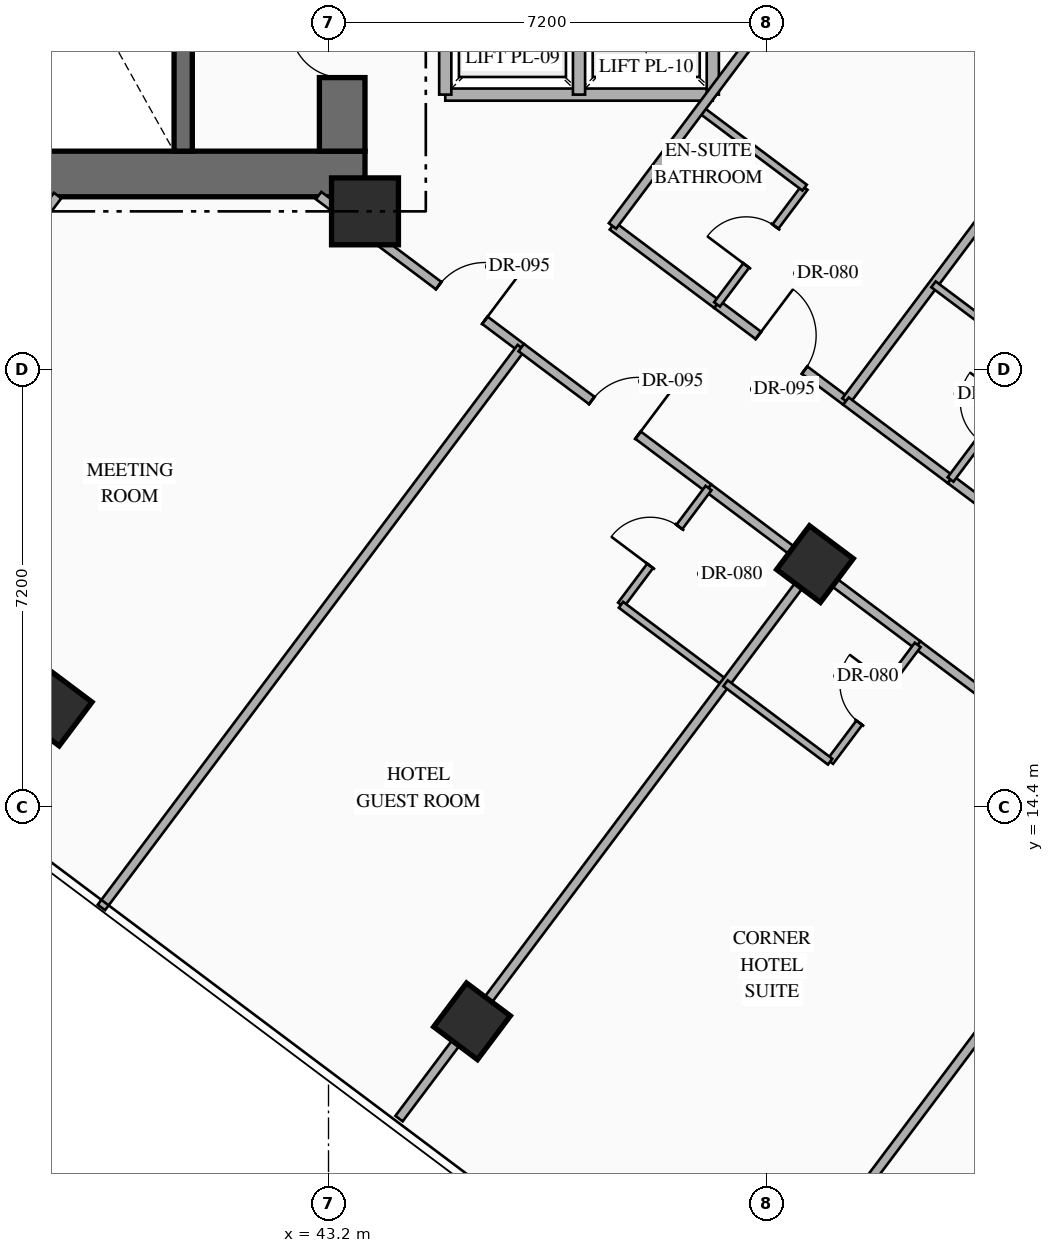
"""IFC4 building model, lengths in metres.
Left out: names, types, materials, properties, quantities, classifications, styles, units other than length and angle.
Written with IfcOpenShell. Run it as: python <this file> out.ifc"""

import sys

from ifc_helpers import new_model, si_unit, direction, frame, frame_2d, origin, origin_2d, place, context, subcontext, project, spatial, rectangle, hollow_rectangle, extrude, element, fill, save


model = new_model("IFC4")
c1 = context("Model", 3, precision=1e-05, world=origin(), true_north=direction((0.0, 1.0)))
c2 = subcontext(c1, "Body", "Model", "MODEL_VIEW")
j1 = project(units=[si_unit("LENGTHUNIT", "METRE"), si_unit("PLANEANGLEUNIT", "RADIAN")], contexts=[c1])
p1 = place(None, origin())
s1 = spatial("IfcSite", under=j1, at=p1, CompositionType="ELEMENT")
p2 = place(p1, origin())
s2 = spatial("IfcBuilding", under=s1, at=p2, CompositionType="ELEMENT")
p3 = place(p2, frame((0.0, 0.0, 88.0)))
s3 = spatial("IfcBuildingStorey", under=s2, at=p3, CompositionType="ELEMENT", Elevation=88.0)
p4 = place(p3, frame((35.74, 24.815, 0.0), z_axis=(0.0, 0.0, 1.0), x_axis=(1.0, 0.0, 0.0)))
e1 = element("IfcWall", 1, at=p4, inside=s3, PredefinedType="SHEAR", context=c2, shape_type="SweptSolid", body=[
    extrude(rectangle(XDim=8.06, YDim=0.75, at=frame_2d((4.03, 0.0))), origin(), (0.0, 0.0, 1.0), 3.35),
])
p5 = place(p3, frame((43.425, 25.19, 0.0), z_axis=(0.0, 0.0, 1.0), x_axis=(0.0, 1.0, 0.0)))
e2 = element("IfcWall", 2, at=p5, inside=s3, PredefinedType="SHEAR", context=c2, shape_type="SweptSolid", body=[
    extrude(rectangle(XDim=9.48, YDim=0.75, at=frame_2d((4.74, 0.0))), origin(), (0.0, 0.0, 1.0), 3.35),
])
p6 = place(p5, frame((1.21, 0.0, 0.0)))
e3 = element("IfcOpeningElement", 3, at=p6, cuts=e2, PredefinedType="OPENING", context=c2, shape_type="SweptSolid", body=[
    extrude(rectangle(XDim=0.85, YDim=2.08, at=frame_2d((0.425, 1.04))), frame((0.0, 0.385, 0.0), z_axis=(0.0, -1.0, 0.0), x_axis=(1.0, 0.0, 0.0)), (0.0, 0.0, 1.0), 0.77),
])
p7 = place(p5, frame((4.46, 0.0, 0.0)))
e4 = element("IfcOpeningElement", 4, at=p7, cuts=e2, PredefinedType="OPENING", context=c2, shape_type="SweptSolid", body=[
    extrude(rectangle(XDim=0.85, YDim=2.08, at=frame_2d((0.425, 1.04))), frame((0.0, 0.385, 0.0), z_axis=(0.0, -1.0, 0.0), x_axis=(1.0, 0.0, 0.0)), (0.0, 0.0, 1.0), 0.77),
])
p8 = place(p3, frame((40.81, 25.19, 0.0), z_axis=(0.0, 0.0, 1.0), x_axis=(0.0, 1.0, 0.0)))
e5 = element("IfcWall", 5, at=p8, inside=s3, PredefinedType="SHEAR", context=c2, shape_type="SweptSolid", body=[
    extrude(rectangle(XDim=9.48, YDim=0.3, at=frame_2d((4.74, 0.0))), origin(), (0.0, 0.0, 1.0), 3.35),
])
p9 = place(p3, frame((43.8, 24.2, 0.0), z_axis=(0.0, 0.0, 1.0), x_axis=(1.0, 0.0, 0.0)))
e6 = element("IfcColumn", 6, at=p9, inside=s3, PredefinedType="COLUMN", context=c2, shape_type="SweptSolid", body=[
    extrude(rectangle(XDim=1.1, YDim=1.1, at=origin_2d()), origin(), (0.0, 0.0, 1.0), 3.35),
])
for number, where, z_axis, x_axis in (
    (7, (38.68, 16.04, 0.0), (0.0, 0.0, 1.0), (0.8, -0.6, 0.0)),
    (8, (45.56, 10.88, 0.0), (0.0, 0.0, 1.0), (0.8, -0.6, 0.0)),
    (9, (51.2, 18.4, 0.0), (0.0, 0.0, 1.0), (0.8, -0.6, 0.0)),
):
    element("IfcColumn", number, at=place(p3, frame(where, z_axis=z_axis, x_axis=x_axis)), inside=s3, PredefinedType="COLUMN", context=c2, shape_type="SweptSolid", body=[
        extrude(hollow_rectangle(XDim=0.9, YDim=0.9, WallThickness=0.036, at=origin_2d()), origin(), (0.0, 0.0, 1.0), 3.35),
    ])
p10 = place(p3, frame((44.86, 40.73, 0.0), z_axis=(0.0, 0.0, 1.0), x_axis=(0.800006902154, -0.599990797017, 0.0)))
e10 = element("IfcWall", 10, at=p10, inside=s3, PredefinedType="STANDARD", context=c2, shape_type="SweptSolid", body=[
    extrude(rectangle(XDim=29.712, YDim=0.28, at=frame_2d((14.856, 0.0))), origin(), (0.0, 0.0, 1.0), 3.05),
])
p11 = place(p10, frame((14.249, 0.0, 0.0)))
e11 = element("IfcOpeningElement", 11, at=p11, cuts=e10, PredefinedType="OPENING", context=c2, shape_type="SweptSolid", body=[
    extrude(rectangle(XDim=1.1, YDim=2.2, at=frame_2d((0.55, 1.1))), frame((0.0, 0.15, 0.0), z_axis=(0.0, -1.0, 0.0), x_axis=(1.0, 0.0, 0.0)), (0.0, 0.0, 1.0), 0.3),
])
p12 = place(p10, frame((1.612, 0.0, 0.85)))
e12 = element("IfcOpeningElement", 12, at=p12, cuts=e10, PredefinedType="OPENING", context=c2, shape_type="SweptSolid", body=[
    extrude(rectangle(XDim=1.4, YDim=1.8, at=frame_2d((0.7, 0.9))), frame((0.0, 0.15, 0.0), z_axis=(0.0, -1.0, 0.0), x_axis=(1.0, 0.0, 0.0)), (0.0, 0.0, 1.0), 0.3),
])
p13 = place(p10, frame((5.667, 0.0, 0.85)))
e13 = element("IfcOpeningElement", 13, at=p13, cuts=e10, PredefinedType="OPENING", context=c2, shape_type="SweptSolid", body=[
    extrude(rectangle(XDim=1.4, YDim=1.8, at=frame_2d((0.7, 0.9))), frame((0.0, 0.15, 0.0), z_axis=(0.0, -1.0, 0.0), x_axis=(1.0, 0.0, 0.0)), (0.0, 0.0, 1.0), 0.3),
])
p14 = place(p10, frame((9.912, 0.0, 0.85)))
e14 = element("IfcOpeningElement", 14, at=p14, cuts=e10, PredefinedType="OPENING", context=c2, shape_type="SweptSolid", body=[
    extrude(rectangle(XDim=1.4, YDim=1.8, at=frame_2d((0.7, 0.9))), frame((0.0, 0.15, 0.0), z_axis=(0.0, -1.0, 0.0), x_axis=(1.0, 0.0, 0.0)), (0.0, 0.0, 1.0), 0.3),
])
p15 = place(p10, frame((19.528, 0.0, 0.85)))
e15 = element("IfcOpeningElement", 15, at=p15, cuts=e10, PredefinedType="OPENING", context=c2, shape_type="SweptSolid", body=[
    extrude(rectangle(XDim=1.4, YDim=1.8, at=frame_2d((0.7, 0.9))), frame((0.0, 0.15, 0.0), z_axis=(0.0, -1.0, 0.0), x_axis=(1.0, 0.0, 0.0)), (0.0, 0.0, 1.0), 0.3),
])
p16 = place(p10, frame((23.451, 0.0, 0.85)))
e16 = element("IfcOpeningElement", 16, at=p16, cuts=e10, PredefinedType="OPENING", context=c2, shape_type="SweptSolid", body=[
    extrude(rectangle(XDim=1.4, YDim=1.8, at=frame_2d((0.7, 0.9))), frame((0.0, 0.15, 0.0), z_axis=(0.0, -1.0, 0.0), x_axis=(1.0, 0.0, 0.0)), (0.0, 0.0, 1.0), 0.3),
])
p17 = place(p10, frame((27.852, 0.0, 0.85)))
e17 = element("IfcOpeningElement", 17, at=p17, cuts=e10, PredefinedType="OPENING", context=c2, shape_type="SweptSolid", body=[
    extrude(rectangle(XDim=1.4, YDim=1.8, at=frame_2d((0.7, 0.9))), frame((0.0, 0.15, 0.0), z_axis=(0.0, -1.0, 0.0), x_axis=(1.0, 0.0, 0.0)), (0.0, 0.0, 1.0), 0.3),
])
p18 = place(p3, frame((45.12, 26.12, 0.0), z_axis=(0.0, 0.0, 1.0), x_axis=(1.0, 0.0, 0.0)))
e18 = element("IfcWall", 18, at=p18, inside=s3, PredefinedType="STANDARD", context=c2, shape_type="SweptSolid", body=[
    extrude(rectangle(XDim=4.4, YDim=0.2, at=frame_2d((2.2, 0.0))), origin(), (0.0, 0.0, 1.0), 3.05),
])
for number, where, z_axis, x_axis in (
    (19, (45.12, 26.12, 0.0), (0.0, 0.0, 1.0), (0.0, 1.0, 0.0)),
    (20, (49.52, 26.12, 0.0), (0.0, 0.0, 1.0), (0.0, 1.0, 0.0)),
    (21, (47.32, 26.12, 0.0), (0.0, 0.0, 1.0), (0.0, 1.0, 0.0)),
):
    element("IfcWall", number, at=place(p3, frame(where, z_axis=z_axis, x_axis=x_axis)), inside=s3, PredefinedType="STANDARD", context=c2, shape_type="SweptSolid", body=[
        extrude(rectangle(XDim=2.16, YDim=0.2, at=frame_2d((1.08, 0.0))), origin(), (0.0, 0.0, 1.0), 3.05),
    ])
p19 = place(p3, frame((43.037, 24.46, 0.0), z_axis=(0.0, 0.0, 1.0), x_axis=(0.799971872363, -0.600037501685, 0.0)))
e22 = element("IfcWall", 22, at=p19, inside=s3, PredefinedType="PARTITIONING", context=c2, shape_type="SweptSolid", body=[
    extrude(rectangle(XDim=4.167, YDim=0.15, at=frame_2d((2.083, 0.0))), origin(), (0.0, 0.0, 1.0), 2.345),
])
p20 = place(p19, frame((2.468, 0.0, 0.0)))
e23 = element("IfcOpeningElement", 23, at=p20, cuts=e22, PredefinedType="OPENING", context=c2, shape_type="SweptSolid", body=[
    extrude(rectangle(XDim=0.95, YDim=2.15, at=frame_2d((0.475, 1.075))), frame((0.0, 0.085, 0.0), z_axis=(0.0, -1.0, 0.0), x_axis=(1.0, 0.0, 0.0)), (0.0, 0.0, 1.0), 0.17),
])
p21 = place(p3, frame((33.384, 17.312, 0.0), z_axis=(0.0, 0.0, 1.0), x_axis=(0.600008743659, 0.799993442181, 0.0)))
e24 = element("IfcWall", 24, at=p21, inside=s3, PredefinedType="PARTITIONING", context=c2, shape_type="SweptSolid", body=[
    extrude(rectangle(XDim=8.935, YDim=0.15, at=frame_2d((4.468, 0.0))), origin(), (0.0, 0.0, 1.0), 3.05),
])
p22 = place(p3, frame((39.464, 12.752, 0.0), z_axis=(0.0, 0.0, 1.0), x_axis=(0.6, 0.8, 0.0)))
e25 = element("IfcWall", 25, at=p22, inside=s3, PredefinedType="PARTITIONING", context=c2, shape_type="SweptSolid", body=[
    extrude(rectangle(XDim=11.51, YDim=0.15, at=frame_2d((5.755, 0.0))), origin(), (0.0, 0.0, 1.0), 3.05),
])
p23 = place(p3, frame((47.87, 23.96, 0.0), z_axis=(0.0, 0.0, 1.0), x_axis=(0.79998637334, -0.60001816845, 0.0)))
e26 = element("IfcWall", 26, at=p23, inside=s3, PredefinedType="PARTITIONING", context=c2, shape_type="SweptSolid", body=[
    extrude(rectangle(XDim=2.15, YDim=0.15, at=frame_2d((1.075, 0.0))), origin(), (0.0, 0.0, 1.0), 2.695),
])
p24 = place(p3, frame((49.59, 22.67, 0.0), z_axis=(0.0, 0.0, 1.0), x_axis=(0.800011056104, -0.599985258246, 0.0)))
e27 = element("IfcWall", 27, at=p24, inside=s3, PredefinedType="PARTITIONING", context=c2, shape_type="SweptSolid", body=[
    extrude(rectangle(XDim=2.65, YDim=0.15, at=frame_2d((1.325, 0.0))), origin(), (0.0, 0.0, 1.0), 2.695),
])
p25 = place(p24, frame((0.85, 0.0, 0.0)))
e28 = element("IfcOpeningElement", 28, at=p25, cuts=e27, PredefinedType="OPENING", context=c2, shape_type="SweptSolid", body=[
    extrude(rectangle(XDim=0.95, YDim=2.15, at=frame_2d((0.475, 1.075))), frame((0.0, 0.085, 0.0), z_axis=(0.0, -1.0, 0.0), x_axis=(1.0, 0.0, 0.0)), (0.0, 0.0, 1.0), 0.17),
])
p26 = place(p3, frame((49.59, 22.67, 0.0), z_axis=(0.0, 0.0, 1.0), x_axis=(0.599951172744, 0.800036618114, 0.0)))
e29 = element("IfcWall", 29, at=p26, inside=s3, PredefinedType="PARTITIONING", context=c2, shape_type="SweptSolid", body=[
    extrude(rectangle(XDim=2.4, YDim=0.12, at=frame_2d((1.2, 0.0))), origin(), (0.0, 0.0, 1.0), 3.05),
])
p27 = place(p26, frame((0.8, 0.0, 0.0)))
e30 = element("IfcOpeningElement", 30, at=p27, cuts=e29, PredefinedType="OPENING", context=c2, shape_type="SweptSolid", body=[
    extrude(rectangle(XDim=0.8, YDim=2.06, at=frame_2d((0.4, 1.03))), frame((0.0, 0.07, 0.0), z_axis=(0.0, -1.0, 0.0), x_axis=(1.0, 0.0, 0.0)), (0.0, 0.0, 1.0), 0.14),
])
p28 = place(p3, frame((49.31, 25.88, 0.0), z_axis=(0.0, 0.0, 1.0), x_axis=(0.800040880289, -0.59994548908, 0.0)))
e31 = element("IfcWall", 31, at=p28, inside=s3, PredefinedType="PARTITIONING", context=c2, shape_type="SweptSolid", body=[
    extrude(rectangle(XDim=2.15, YDim=0.12, at=frame_2d((1.075, 0.0))), origin(), (0.0, 0.0, 1.0), 3.05),
])
for number, where, z_axis, x_axis in (
    (32, (47.87, 23.96, 0.0), (0.0, 0.0, 1.0), (0.6, 0.8, 0.0)),
    (33, (51.71, 21.08, 0.0), (0.0, 0.0, 1.0), (0.6, 0.8, 0.0)),
):
    element("IfcWall", number, at=place(p3, frame(where, z_axis=z_axis, x_axis=x_axis)), inside=s3, PredefinedType="PARTITIONING", context=c2, shape_type="SweptSolid", body=[
        extrude(rectangle(XDim=11.55, YDim=0.15, at=frame_2d((5.775, 0.0))), origin(), (0.0, 0.0, 1.0), 3.05),
    ])
p29 = place(p3, frame((51.71, 21.08, 0.0), z_axis=(0.0, 0.0, 1.0), x_axis=(0.79998637334, -0.60001816845, 0.0)))
e34 = element("IfcWall", 34, at=p29, inside=s3, PredefinedType="PARTITIONING", context=c2, shape_type="SweptSolid", body=[
    extrude(rectangle(XDim=2.15, YDim=0.15, at=frame_2d((1.075, 0.0))), origin(), (0.0, 0.0, 1.0), 2.695),
])
p30 = place(p3, frame((53.43, 19.79, 0.0), z_axis=(0.0, 0.0, 1.0), x_axis=(0.8, -0.6, 0.0)))
e35 = element("IfcWall", 35, at=p30, inside=s3, PredefinedType="PARTITIONING", context=c2, shape_type="SweptSolid", body=[
    extrude(rectangle(XDim=2.65, YDim=0.15, at=frame_2d((1.325, 0.0))), origin(), (0.0, 0.0, 1.0), 2.695),
])
p31 = place(p30, frame((0.85, 0.0, 0.0)))
e36 = element("IfcOpeningElement", 36, at=p31, cuts=e35, PredefinedType="OPENING", context=c2, shape_type="SweptSolid", body=[
    extrude(rectangle(XDim=0.95, YDim=2.15, at=frame_2d((0.475, 1.075))), frame((0.0, 0.085, 0.0), z_axis=(0.0, -1.0, 0.0), x_axis=(1.0, 0.0, 0.0)), (0.0, 0.0, 1.0), 0.17),
])
p32 = place(p3, frame((53.43, 19.79, 0.0), z_axis=(0.0, 0.0, 1.0), x_axis=(0.600065100855, 0.79995117022, 0.0)))
e37 = element("IfcWall", 37, at=p32, inside=s3, PredefinedType="PARTITIONING", context=c2, shape_type="SweptSolid", body=[
    extrude(rectangle(XDim=2.4, YDim=0.12, at=frame_2d((1.2, 0.0))), origin(), (0.0, 0.0, 1.0), 3.05),
])
p33 = place(p32, frame((0.8, 0.0, 0.0)))
e38 = element("IfcOpeningElement", 38, at=p33, cuts=e37, PredefinedType="OPENING", context=c2, shape_type="SweptSolid", body=[
    extrude(rectangle(XDim=0.8, YDim=2.06, at=frame_2d((0.4, 1.03))), frame((0.0, 0.07, 0.0), z_axis=(0.0, -1.0, 0.0), x_axis=(1.0, 0.0, 0.0)), (0.0, 0.0, 1.0), 0.14),
])
p34 = place(p3, frame((53.15, 23.0, 0.0), z_axis=(0.0, 0.0, 1.0), x_axis=(0.800027249606, -0.599963665473, 0.0)))
e39 = element("IfcWall", 39, at=p34, inside=s3, PredefinedType="PARTITIONING", context=c2, shape_type="SweptSolid", body=[
    extrude(rectangle(XDim=2.15, YDim=0.12, at=frame_2d((1.075, 0.0))), origin(), (0.0, 0.0, 1.0), 3.05),
])
p35 = place(p3, frame((46.37, 21.96, 0.0), z_axis=(0.0, 0.0, 1.0), x_axis=(0.799977170108, -0.600030438649, 0.0)))
e40 = element("IfcWall", 40, at=p35, inside=s3, PredefinedType="PARTITIONING", context=c2, shape_type="SweptSolid", body=[
    extrude(rectangle(XDim=3.85, YDim=0.15, at=frame_2d((1.925, 0.0))), origin(), (0.0, 0.0, 1.0), 2.345),
])
p36 = place(p35, frame((1.45, 0.0, 0.0)))
e41 = element("IfcOpeningElement", 41, at=p36, cuts=e40, PredefinedType="OPENING", context=c2, shape_type="SweptSolid", body=[
    extrude(rectangle(XDim=0.95, YDim=2.15, at=frame_2d((0.475, 1.075))), frame((0.0, 0.085, 0.0), z_axis=(0.0, -1.0, 0.0), x_axis=(1.0, 0.0, 0.0)), (0.0, 0.0, 1.0), 0.17),
])
p37 = place(p3, frame((49.45, 19.65, 0.0), z_axis=(0.0, 0.0, 1.0), x_axis=(0.800040880289, -0.59994548908, 0.0)))
e42 = element("IfcWall", 42, at=p37, inside=s3, PredefinedType="PARTITIONING", context=c2, shape_type="SweptSolid", body=[
    extrude(rectangle(XDim=2.15, YDim=0.15, at=frame_2d((1.075, 0.0))), origin(), (0.0, 0.0, 1.0), 2.345),
])
p38 = place(p3, frame((48.01, 17.73, 0.0), z_axis=(0.0, 0.0, 1.0), x_axis=(0.6, 0.8, 0.0)))
e43 = element("IfcWall", 43, at=p38, inside=s3, PredefinedType="PARTITIONING", context=c2, shape_type="SweptSolid", body=[
    extrude(rectangle(XDim=2.4, YDim=0.12, at=frame_2d((1.2, 0.0))), origin(), (0.0, 0.0, 1.0), 3.05),
])
p39 = place(p38, frame((0.8, 0.0, 0.0)))
e44 = element("IfcOpeningElement", 44, at=p39, cuts=e43, PredefinedType="OPENING", context=c2, shape_type="SweptSolid", body=[
    extrude(rectangle(XDim=0.8, YDim=2.06, at=frame_2d((0.4, 1.03))), frame((0.0, 0.07, 0.0), z_axis=(0.0, -1.0, 0.0), x_axis=(1.0, 0.0, 0.0)), (0.0, 0.0, 1.0), 0.14),
])
p40 = place(p3, frame((48.01, 17.73, 0.0), z_axis=(0.0, 0.0, 1.0), x_axis=(0.79998637334, -0.60001816845, 0.0)))
e45 = element("IfcWall", 45, at=p40, inside=s3, PredefinedType="PARTITIONING", context=c2, shape_type="SweptSolid", body=[
    extrude(rectangle(XDim=2.15, YDim=0.12, at=frame_2d((1.075, 0.0))), origin(), (0.0, 0.0, 1.0), 3.05),
])
p41 = place(p3, frame((44.36, 9.28, 0.0), z_axis=(0.0, 0.0, 1.0), x_axis=(0.599986233332, 0.800010324816, 0.0)))
e46 = element("IfcWall", 46, at=p41, inside=s3, PredefinedType="PARTITIONING", context=c2, shape_type="SweptSolid", body=[
    extrude(rectangle(XDim=11.35, YDim=0.15, at=frame_2d((5.675, 0.0))), origin(), (0.0, 0.0, 1.0), 2.345),
])
p42 = place(p3, frame((51.17, 18.36, 0.0), z_axis=(0.0, 0.0, 1.0), x_axis=(0.79998637334, -0.60001816845, 0.0)))
e47 = element("IfcWall", 47, at=p42, inside=s3, PredefinedType="PARTITIONING", context=c2, shape_type="SweptSolid", body=[
    extrude(rectangle(XDim=2.15, YDim=0.15, at=frame_2d((1.075, 0.0))), origin(), (0.0, 0.0, 1.0), 2.345),
])
p43 = place(p3, frame((52.89, 17.07, 0.0), z_axis=(0.0, 0.0, 1.0), x_axis=(0.800012600101, -0.599983199498, 0.0)))
e48 = element("IfcWall", 48, at=p43, inside=s3, PredefinedType="PARTITIONING", context=c2, shape_type="SweptSolid", body=[
    extrude(rectangle(XDim=4.65, YDim=0.15, at=frame_2d((2.325, 0.0))), origin(), (0.0, 0.0, 1.0), 2.345),
])
p44 = place(p43, frame((1.85, 0.0, 0.0)))
e49 = element("IfcOpeningElement", 49, at=p44, cuts=e48, PredefinedType="OPENING", context=c2, shape_type="SweptSolid", body=[
    extrude(rectangle(XDim=0.95, YDim=2.15, at=frame_2d((0.475, 1.075))), frame((0.0, 0.085, 0.0), z_axis=(0.0, -1.0, 0.0), x_axis=(1.0, 0.0, 0.0)), (0.0, 0.0, 1.0), 0.17),
])
p45 = place(p3, frame((51.45, 15.15, 0.0), z_axis=(0.0, 0.0, 1.0), x_axis=(0.599951172744, 0.800036618114, 0.0)))
e50 = element("IfcWall", 50, at=p45, inside=s3, PredefinedType="PARTITIONING", context=c2, shape_type="SweptSolid", body=[
    extrude(rectangle(XDim=2.4, YDim=0.12, at=frame_2d((1.2, 0.0))), origin(), (0.0, 0.0, 1.0), 3.05),
])
p46 = place(p45, frame((0.8, 0.0, 0.0)))
e51 = element("IfcOpeningElement", 51, at=p46, cuts=e50, PredefinedType="OPENING", context=c2, shape_type="SweptSolid", body=[
    extrude(rectangle(XDim=0.8, YDim=2.06, at=frame_2d((0.4, 1.03))), frame((0.0, 0.07, 0.0), z_axis=(0.0, -1.0, 0.0), x_axis=(1.0, 0.0, 0.0)), (0.0, 0.0, 1.0), 0.14),
])
p47 = place(p3, frame((49.73, 16.44, 0.0), z_axis=(0.0, 0.0, 1.0), x_axis=(0.79998637334, -0.60001816845, 0.0)))
e52 = element("IfcWall", 52, at=p47, inside=s3, PredefinedType="PARTITIONING", context=c2, shape_type="SweptSolid", body=[
    extrude(rectangle(XDim=2.15, YDim=0.12, at=frame_2d((1.075, 0.0))), origin(), (0.0, 0.0, 1.0), 3.05),
])
p48 = place(p3, frame((49.8, 5.2, 0.0), z_axis=(0.0, 0.0, 1.0), x_axis=(0.6, 0.8, 0.0)))
e53 = element("IfcWall", 53, at=p48, inside=s3, PredefinedType="PARTITIONING", context=c2, shape_type="SweptSolid", body=[
    extrude(rectangle(XDim=11.35, YDim=0.15, at=frame_2d((5.675, 0.0))), origin(), (0.0, 0.0, 1.0), 3.05),
])
p49 = place(p6, origin())
e54 = element("IfcDoor", 54, at=p49, inside=s3, OperationType="SINGLE_SWING_RIGHT", PredefinedType="DOOR", context=c2, shape_type="SweptSolid", body=[
    extrude(rectangle(XDim=0.85, YDim=2.08, at=frame_2d((0.425, 1.04))), frame((0.0, 0.025, 0.0), z_axis=(0.0, -1.0, 0.0), x_axis=(1.0, 0.0, 0.0)), (0.0, 0.0, 1.0), 0.05),
])
fill(e3, e54)
p50 = place(p20, origin())
e55 = element("IfcDoor", 55, at=p50, inside=s3, OperationType="SINGLE_SWING_RIGHT", PredefinedType="DOOR", context=c2, shape_type="SweptSolid", body=[
    extrude(rectangle(XDim=0.95, YDim=2.15, at=frame_2d((0.475, 1.075))), frame((0.0, 0.025, 0.0), z_axis=(0.0, -1.0, 0.0), x_axis=(1.0, 0.0, 0.0)), (0.0, 0.0, 1.0), 0.05),
])
fill(e23, e55)
p51 = place(p25, origin())
e56 = element("IfcDoor", 56, at=p51, inside=s3, OperationType="SINGLE_SWING_LEFT", PredefinedType="DOOR", context=c2, shape_type="SweptSolid", body=[
    extrude(rectangle(XDim=0.95, YDim=2.15, at=frame_2d((0.475, 1.075))), frame((0.0, 0.025, 0.0), z_axis=(0.0, -1.0, 0.0), x_axis=(1.0, 0.0, 0.0)), (0.0, 0.0, 1.0), 0.05),
])
fill(e28, e56)
p52 = place(p27, origin())
e57 = element("IfcDoor", 57, at=p52, inside=s3, OperationType="SINGLE_SWING_LEFT", PredefinedType="DOOR", context=c2, shape_type="SweptSolid", body=[
    extrude(rectangle(XDim=0.8, YDim=2.06, at=frame_2d((0.4, 1.03))), frame((0.0, 0.025, 0.0), z_axis=(0.0, -1.0, 0.0), x_axis=(1.0, 0.0, 0.0)), (0.0, 0.0, 1.0), 0.05),
])
fill(e30, e57)
p53 = place(p36, origin())
e58 = element("IfcDoor", 58, at=p53, inside=s3, OperationType="SINGLE_SWING_RIGHT", PredefinedType="DOOR", context=c2, shape_type="SweptSolid", body=[
    extrude(rectangle(XDim=0.95, YDim=2.15, at=frame_2d((0.475, 1.075))), frame((0.0, 0.025, 0.0), z_axis=(0.0, -1.0, 0.0), x_axis=(1.0, 0.0, 0.0)), (0.0, 0.0, 1.0), 0.05),
])
fill(e41, e58)
p54 = place(p39, origin())
e59 = element("IfcDoor", 59, at=p54, inside=s3, OperationType="SINGLE_SWING_LEFT", PredefinedType="DOOR", context=c2, shape_type="SweptSolid", body=[
    extrude(rectangle(XDim=0.8, YDim=2.06, at=frame_2d((0.4, 1.03))), frame((0.0, 0.025, 0.0), z_axis=(0.0, -1.0, 0.0), x_axis=(1.0, 0.0, 0.0)), (0.0, 0.0, 1.0), 0.05),
])
fill(e44, e59)
p55 = place(p46, origin())
e60 = element("IfcDoor", 60, at=p55, inside=s3, OperationType="SINGLE_SWING_RIGHT", PredefinedType="DOOR", context=c2, shape_type="SweptSolid", body=[
    extrude(rectangle(XDim=0.8, YDim=2.06, at=frame_2d((0.4, 1.03))), frame((0.0, 0.025, 0.0), z_axis=(0.0, -1.0, 0.0), x_axis=(1.0, 0.0, 0.0)), (0.0, 0.0, 1.0), 0.05),
])
fill(e51, e60)
save(model, sys.argv[1])
